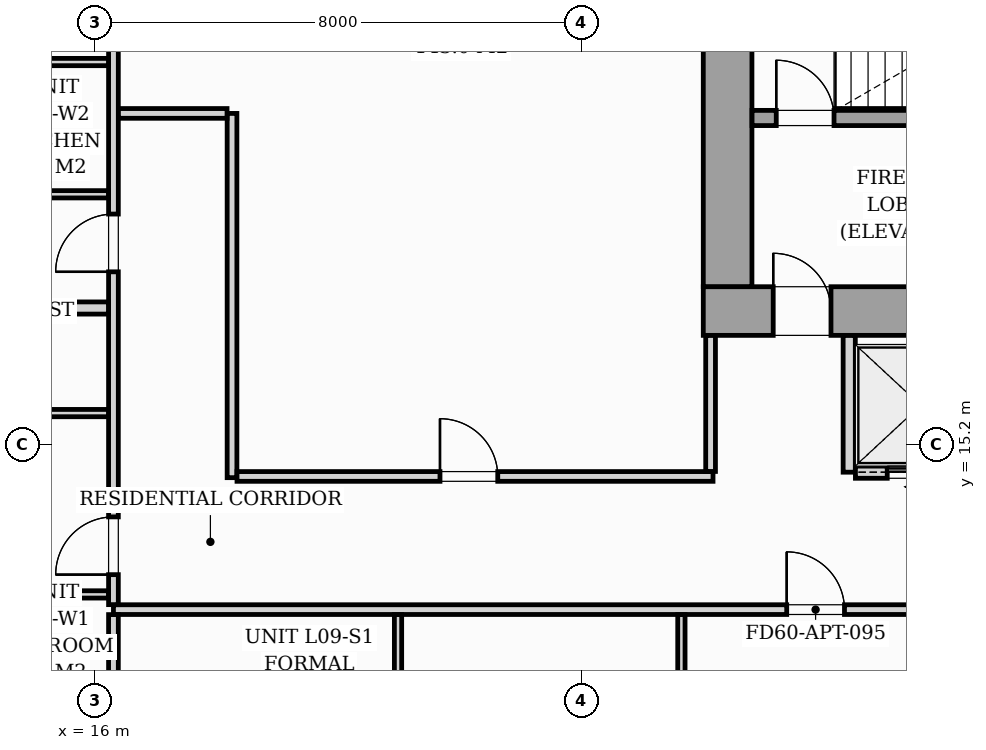
"""IFC4 building model, lengths in metres.
Left out: names, types, materials, properties, quantities, classifications, styles, units other than length and angle.
Written with IfcOpenShell. Run it as: python <this file> out.ifc"""

import sys

from ifc_helpers import new_model, si_unit, direction, frame, frame_2d, origin, origin_2d, place, context, subcontext, project, spatial, rectangle, i_section, extrude, source, transform, mapped, element, fill, save


model = new_model("IFC4")
c1 = context("Model", 3, precision=1e-05, world=origin(), true_north=direction((0.0, 1.0)))
c2 = subcontext(c1, "Body", "Model", "MODEL_VIEW")
j1 = project(units=[si_unit("LENGTHUNIT", "METRE"), si_unit("PLANEANGLEUNIT", "RADIAN")], contexts=[c1])
p1 = place(None, origin())
s1 = spatial("IfcSite", under=j1, at=p1, CompositionType="ELEMENT")
p2 = place(p1, origin())
s2 = spatial("IfcBuilding", under=s1, at=p2, CompositionType="ELEMENT")
p3 = place(p2, frame((0.0, 0.0, 35.8)))
s3 = spatial("IfcBuildingStorey", under=s2, at=p3, CompositionType="ELEMENT", Elevation=35.8)
m1 = source(origin(), c2, "Body", "SweptSolid", [
    extrude(i_section(OverallWidth=0.437, OverallDepth=0.514, WebThickness=0.061, FlangeThickness=0.097, FilletRadius=0.018, at=origin_2d()), origin(), (0.0, 0.0, 1.0), 3.196),
])
p4 = place(p3, frame((26.4, 17.4, 0.002), z_axis=(0.0, 0.0, 1.0), x_axis=(1.0, 0.0, 0.0)))
e1 = element("IfcColumn", 1, at=p4, inside=s3, PredefinedType="PILASTER", context=c2, shape_type="MappedRepresentation", body=[
    mapped(m1, transform((0.0, 0.0, 0.0), scale=1.0)),
])
p5 = place(p3, frame((26.0, 17.4, 0.0), z_axis=(0.0, 0.0, 1.0), x_axis=(1.0, 0.0, 0.0)))
e2 = element("IfcWall", 2, at=p5, inside=s3, PredefinedType="SHEAR", context=c2, shape_type="SweptSolid", body=[
    extrude(rectangle(XDim=20.0, YDim=0.8, at=frame_2d((10.0, 0.0))), origin(), (0.0, 0.0, 1.0), 3.2),
])
p6 = place(p5, frame((1.15, 0.0, 0.0)))
e3 = element("IfcOpeningElement", 3, at=p6, cuts=e2, PredefinedType="OPENING", context=c2, shape_type="SweptSolid", body=[
    extrude(rectangle(XDim=0.95, YDim=2.06, at=frame_2d((0.475, 1.03))), frame((0.0, 0.41, 0.0), z_axis=(0.0, -1.0, 0.0), x_axis=(1.0, 0.0, 0.0)), (0.0, 0.0, 1.0), 0.82),
])
p7 = place(p5, frame((9.58, 0.0, 0.0)))
e4 = element("IfcOpeningElement", 4, at=p7, cuts=e2, PredefinedType="OPENING", context=c2, shape_type="SweptSolid", body=[
    extrude(rectangle(XDim=0.85, YDim=2.0, at=frame_2d((0.425, 1.0))), frame((0.0, 0.41, 0.0), z_axis=(0.0, -1.0, 0.0), x_axis=(1.0, 0.0, 0.0)), (0.0, 0.0, 1.0), 0.82),
])
p8 = place(p5, frame((17.75, 0.0, 0.0)))
e5 = element("IfcOpeningElement", 5, at=p8, cuts=e2, PredefinedType="OPENING", context=c2, shape_type="SweptSolid", body=[
    extrude(rectangle(XDim=0.95, YDim=2.06, at=frame_2d((0.475, 1.03))), frame((0.0, 0.41, 0.0), z_axis=(0.0, -1.0, 0.0), x_axis=(1.0, 0.0, 0.0)), (0.0, 0.0, 1.0), 0.82),
])
p9 = place(p3, frame((26.4, 17.802, 0.0), z_axis=(0.0, 0.0, 1.0), x_axis=(0.0, 1.0, 0.0)))
e6 = element("IfcWall", 6, at=p9, inside=s3, PredefinedType="SHEAR", context=c2, shape_type="SweptSolid", body=[
    extrude(rectangle(XDim=5.796, YDim=0.8, at=frame_2d((2.898, 0.0))), origin(), (0.0, 0.0, 1.0), 3.2),
])
p10 = place(p3, frame((26.802, 20.575, 0.0), z_axis=(0.0, 0.0, 1.0), x_axis=(1.0, 0.0, 0.0)))
e7 = element("IfcWall", 7, at=p10, inside=s3, PredefinedType="SOLIDWALL", context=c2, shape_type="SweptSolid", body=[
    extrude(rectangle(XDim=8.148, YDim=0.25, at=frame_2d((4.074, 0.0))), origin(), (0.0, 0.0, 1.0), 3.2),
])
p11 = place(p10, frame((0.398, 0.0, 0.0)))
e8 = element("IfcOpeningElement", 8, at=p11, cuts=e7, PredefinedType="OPENING", context=c2, shape_type="SweptSolid", body=[
    extrude(rectangle(XDim=0.95, YDim=2.06, at=frame_2d((0.475, 1.03))), frame((0.0, 0.135, 0.0), z_axis=(0.0, -1.0, 0.0), x_axis=(1.0, 0.0, 0.0)), (0.0, 0.0, 1.0), 0.27),
])
p12 = place(p3, frame((28.4, 14.75, 0.0), z_axis=(0.0, 0.0, 1.0), x_axis=(0.0, 1.0, 0.0)))
e9 = element("IfcWall", 9, at=p12, inside=s3, PredefinedType="PARTITIONING", context=c2, shape_type="SweptSolid", body=[
    extrude(rectangle(XDim=2.248, YDim=0.2, at=frame_2d((1.124, 0.0))), origin(), (0.0, 0.0, 1.0), 2.94),
])
p13 = place(p3, frame((28.502, 14.75, 0.0), z_axis=(0.0, 0.0, 1.0), x_axis=(1.0, 0.0, 0.0)))
e10 = element("IfcWall", 10, at=p13, inside=s3, PredefinedType="PARTITIONING", context=c2, shape_type="SweptSolid", body=[
    extrude(rectangle(XDim=2.146, YDim=0.2, at=frame_2d((1.073, 0.0))), origin(), (0.0, 0.0, 1.0), 2.94),
])
p14 = place(p13, frame((0.523, 0.0, 0.0)))
e11 = element("IfcOpeningElement", 11, at=p14, cuts=e10, PredefinedType="OPENING", context=c2, shape_type="SweptSolid", body=[
    extrude(rectangle(XDim=1.05, YDim=2.08, at=frame_2d((0.525, 1.04))), frame((0.0, 0.11, 0.0), z_axis=(0.0, -1.0, 0.0), x_axis=(1.0, 0.0, 0.0)), (0.0, 0.0, 1.0), 0.22),
])
p15 = place(p3, frame((16.3, 12.49, 0.0), z_axis=(0.0, 0.0, 1.0), x_axis=(1.0, 0.0, 0.0)))
e12 = element("IfcWall", 12, at=p15, inside=s3, PredefinedType="PARTITIONING", context=c2, shape_type="SweptSolid", body=[
    extrude(rectangle(XDim=35.2, YDim=0.16, at=frame_2d((17.6, 0.0))), origin(), (0.0, 0.0, 1.0), 2.94),
])
p16 = place(p15, frame((11.072, 0.0, 0.0)))
e13 = element("IfcOpeningElement", 13, at=p16, cuts=e12, PredefinedType="OPENING", context=c2, shape_type="SweptSolid", body=[
    extrude(rectangle(XDim=0.95, YDim=2.06, at=frame_2d((0.475, 1.03))), frame((0.0, 0.09, 0.0), z_axis=(0.0, -1.0, 0.0), x_axis=(1.0, 0.0, 0.0)), (0.0, 0.0, 1.0), 0.18),
])
p17 = place(p15, frame((24.032, 0.0, 0.0)))
e14 = element("IfcOpeningElement", 14, at=p17, cuts=e12, PredefinedType="OPENING", context=c2, shape_type="SweptSolid", body=[
    extrude(rectangle(XDim=0.95, YDim=2.06, at=frame_2d((0.475, 1.03))), frame((0.0, 0.09, 0.0), z_axis=(0.0, -1.0, 0.0), x_axis=(1.0, 0.0, 0.0)), (0.0, 0.0, 1.0), 0.18),
])
p18 = place(p3, frame((16.3, 2.962, 0.0), z_axis=(0.0, 0.0, 1.0), x_axis=(0.0, 1.0, 0.0)))
e15 = element("IfcWall", 15, at=p18, inside=s3, PredefinedType="PARTITIONING", context=c2, shape_type="SweptSolid", body=[
    extrude(rectangle(XDim=9.446, YDim=0.16, at=frame_2d((4.723, 0.0))), origin(), (0.0, 0.0, 1.0), 2.94),
])
p19 = place(p3, frame((16.3, 12.572, 0.0), z_axis=(0.0, 0.0, 1.0), x_axis=(0.0, 1.0, 0.0)))
e16 = element("IfcWall", 16, at=p19, inside=s3, PredefinedType="PARTITIONING", context=c2, shape_type="SweptSolid", body=[
    extrude(rectangle(XDim=14.866, YDim=0.16, at=frame_2d((7.433, 0.0))), origin(), (0.0, 0.0, 1.0), 2.94),
])
p20 = place(p19, frame((0.493, 0.0, 0.0)))
e17 = element("IfcOpeningElement", 17, at=p20, cuts=e16, PredefinedType="OPENING", context=c2, shape_type="SweptSolid", body=[
    extrude(rectangle(XDim=0.95, YDim=2.06, at=frame_2d((0.475, 1.03))), frame((0.0, 0.09, 0.0), z_axis=(0.0, -1.0, 0.0), x_axis=(1.0, 0.0, 0.0)), (0.0, 0.0, 1.0), 0.18),
])
p21 = place(p19, frame((5.473, 0.0, 0.0)))
e18 = element("IfcOpeningElement", 18, at=p21, cuts=e16, PredefinedType="OPENING", context=c2, shape_type="SweptSolid", body=[
    extrude(rectangle(XDim=0.95, YDim=2.06, at=frame_2d((0.475, 1.03))), frame((0.0, 0.09, 0.0), z_axis=(0.0, -1.0, 0.0), x_axis=(1.0, 0.0, 0.0)), (0.0, 0.0, 1.0), 0.18),
])
p22 = place(p3, frame((20.98, 2.962, 0.0), z_axis=(0.0, 0.0, 1.0), x_axis=(0.0, 1.0, 0.0)))
e19 = element("IfcWall", 19, at=p22, inside=s3, PredefinedType="PARTITIONING", context=c2, shape_type="SweptSolid", body=[
    extrude(rectangle(XDim=9.446, YDim=0.12, at=frame_2d((4.723, 0.0))), origin(), (0.0, 0.0, 1.0), 2.94),
])
p23 = place(p22, frame((4.288, 0.0, 0.0)))
e20 = element("IfcOpeningElement", 20, at=p23, cuts=e19, PredefinedType="OPENING", context=c2, shape_type="SweptSolid", body=[
    extrude(rectangle(XDim=0.85, YDim=2.05, at=frame_2d((0.425, 1.025))), frame((0.0, 0.07, 0.0), z_axis=(0.0, -1.0, 0.0), x_axis=(1.0, 0.0, 0.0)), (0.0, 0.0, 1.0), 0.14),
])
p24 = place(p3, frame((25.64, 2.78, 0.0), z_axis=(0.0, 0.0, 1.0), x_axis=(0.0, 1.0, 0.0)))
e21 = element("IfcWall", 21, at=p24, inside=s3, PredefinedType="PARTITIONING", context=c2, shape_type="SweptSolid", body=[
    extrude(rectangle(XDim=9.628, YDim=0.12, at=frame_2d((4.814, 0.0))), origin(), (0.0, 0.0, 1.0), 2.94),
])
p25 = place(p24, frame((4.47, 0.0, 0.0)))
e22 = element("IfcOpeningElement", 22, at=p25, cuts=e21, PredefinedType="OPENING", context=c2, shape_type="SweptSolid", body=[
    extrude(rectangle(XDim=0.85, YDim=2.05, at=frame_2d((0.425, 1.025))), frame((0.0, 0.07, 0.0), z_axis=(0.0, -1.0, 0.0), x_axis=(1.0, 0.0, 0.0)), (0.0, 0.0, 1.0), 0.14),
])
p26 = place(p3, frame((5.88, 17.45, 0.0), z_axis=(0.0, 0.0, 1.0), x_axis=(1.0, 0.0, 0.0)))
e23 = element("IfcWall", 23, at=p26, inside=s3, PredefinedType="PARTITIONING", context=c2, shape_type="SweptSolid", body=[
    extrude(rectangle(XDim=10.338, YDim=0.2, at=frame_2d((5.169, 0.0))), origin(), (0.0, 0.0, 1.0), 2.94),
])
p27 = place(p3, frame((13.962, 12.74, 0.0), z_axis=(0.0, 0.0, 1.0), x_axis=(1.0, 0.0, 0.0)))
e24 = element("IfcWall", 24, at=p27, inside=s3, PredefinedType="PARTITIONING", context=c2, shape_type="SweptSolid", body=[
    extrude(rectangle(XDim=2.256, YDim=0.12, at=frame_2d((1.128, 0.0))), origin(), (0.0, 0.0, 1.0), 2.94),
])
p28 = place(p3, frame((5.88, 15.722, 0.0), z_axis=(0.0, 0.0, 1.0), x_axis=(1.0, 0.0, 0.0)))
e25 = element("IfcWall", 25, at=p28, inside=s3, PredefinedType="PARTITIONING", context=c2, shape_type="SweptSolid", body=[
    extrude(rectangle(XDim=10.338, YDim=0.12, at=frame_2d((5.169, 0.0))), origin(), (0.0, 0.0, 1.0), 2.045),
])
p29 = place(p28, frame((4.735, 0.0, 0.0)))
e26 = element("IfcOpeningElement", 26, at=p29, cuts=e25, PredefinedType="OPENING", context=c2, shape_type="SweptSolid", body=[
    extrude(rectangle(XDim=0.85, YDim=2.01, at=frame_2d((0.425, 1.005))), frame((0.0, 0.07, 0.0), z_axis=(0.0, -1.0, 0.0), x_axis=(1.0, 0.0, 0.0)), (0.0, 0.0, 1.0), 0.14),
])
for number, where, z_axis, x_axis in (
    (27, (13.962, 21.495, 0.0), (0.0, 0.0, 1.0), (1.0, 0.0, 0.0)),
    (28, (13.962, 19.32, 0.0), (0.0, 0.0, 1.0), (1.0, 0.0, 0.0)),
):
    element("IfcWall", number, at=place(p3, frame(where, z_axis=z_axis, x_axis=x_axis)), inside=s3, PredefinedType="PARTITIONING", context=c2, shape_type="SweptSolid", body=[
        extrude(rectangle(XDim=2.256, YDim=0.12, at=frame_2d((1.128, 0.0))), origin(), (0.0, 0.0, 1.0), 2.94),
    ])
p30 = place(p3, frame((18.25, 14.66, 0.0), z_axis=(0.0, 0.0, 1.0), x_axis=(0.0, 1.0, 0.0)))
e29 = element("IfcWall", 29, at=p30, inside=s3, PredefinedType="PARTITIONING", context=c2, shape_type="SweptSolid", body=[
    extrude(rectangle(XDim=5.99, YDim=0.16, at=frame_2d((2.995, 0.0))), origin(), (0.0, 0.0, 1.0), 2.94),
])
p31 = place(p3, frame((16.382, 20.65, 0.0), z_axis=(0.0, 0.0, 1.0), x_axis=(1.0, 0.0, 0.0)))
e30 = element("IfcWall", 30, at=p31, inside=s3, PredefinedType="PARTITIONING", context=c2, shape_type="SweptSolid", body=[
    extrude(rectangle(XDim=1.786, YDim=0.16, at=frame_2d((0.893, 0.0))), origin(), (0.0, 0.0, 1.0), 2.94),
])
p32 = place(p3, frame((18.332, 14.68, 0.0), z_axis=(0.0, 0.0, 1.0), x_axis=(1.0, 0.0, 0.0)))
e31 = element("IfcWall", 31, at=p32, inside=s3, PredefinedType="PARTITIONING", context=c2, shape_type="SweptSolid", body=[
    extrude(rectangle(XDim=7.828, YDim=0.16, at=frame_2d((3.914, 0.0))), origin(), (0.0, 0.0, 1.0), 2.94),
])
p33 = place(p32, frame((3.338, 0.0, 0.0)))
e32 = element("IfcOpeningElement", 32, at=p33, cuts=e31, PredefinedType="OPENING", context=c2, shape_type="SweptSolid", body=[
    extrude(rectangle(XDim=0.95, YDim=2.06, at=frame_2d((0.475, 1.03))), frame((0.0, 0.09, 0.0), z_axis=(0.0, -1.0, 0.0), x_axis=(1.0, 0.0, 0.0)), (0.0, 0.0, 1.0), 0.18),
])
p34 = place(p3, frame((26.12, 14.762, 0.0), z_axis=(0.0, 0.0, 1.0), x_axis=(0.0, 1.0, 0.0)))
e33 = element("IfcWall", 33, at=p34, inside=s3, PredefinedType="PARTITIONING", context=c2, shape_type="SweptSolid", body=[
    extrude(rectangle(XDim=2.236, YDim=0.16, at=frame_2d((1.118, 0.0))), origin(), (0.0, 0.0, 1.0), 2.94),
])
m2 = source(origin(), c2, "Body", "SweptSolid", [
    extrude(rectangle(XDim=0.95, YDim=2.06, at=frame_2d((0.475, 1.03))), frame((0.0, 0.025, 0.0), z_axis=(0.0, -1.0, 0.0), x_axis=(1.0, 0.0, 0.0)), (0.0, 0.0, 1.0), 0.05),
])
p35 = place(p6, origin())
e34 = element("IfcDoor", 34, at=p35, inside=s3, OperationType="SINGLE_SWING_LEFT", PredefinedType="DOOR", context=c2, shape_type="MappedRepresentation", body=[
    mapped(m2, transform((0.0, 0.0, 0.0), scale=1.0)),
])
fill(e3, e34)
p36 = place(p11, origin())
e35 = element("IfcDoor", 35, at=p36, inside=s3, OperationType="SINGLE_SWING_LEFT", PredefinedType="DOOR", context=c2, shape_type="MappedRepresentation", body=[
    mapped(m2, transform((0.0, 0.0, 0.0), scale=1.0)),
])
fill(e8, e35)
m3 = source(origin(), c2, "Body", "SweptSolid", [
    extrude(rectangle(XDim=1.05, YDim=2.08, at=frame_2d((0.525, 1.04))), frame((0.0, 0.025, 0.0), z_axis=(0.0, -1.0, 0.0), x_axis=(1.0, 0.0, 0.0)), (0.0, 0.0, 1.0), 0.05),
])
p37 = place(p14, origin())
e36 = element("IfcDoor", 36, at=p37, inside=s3, OperationType="SLIDING_TO_LEFT", PredefinedType="DOOR", context=c2, shape_type="MappedRepresentation", body=[
    mapped(m3, transform((0.0, 0.0, 0.0), scale=1.0)),
])
fill(e11, e36)
m4 = source(origin(), c2, "Body", "SweptSolid", [
    extrude(rectangle(XDim=0.95, YDim=2.06, at=frame_2d((0.475, 1.03))), frame((0.0, 0.025, 0.0), z_axis=(0.0, -1.0, 0.0), x_axis=(1.0, 0.0, 0.0)), (0.0, 0.0, 1.0), 0.05),
])
p38 = place(p16, origin())
e37 = element("IfcDoor", 37, at=p38, inside=s3, OperationType="SINGLE_SWING_LEFT", PredefinedType="DOOR", context=c2, shape_type="MappedRepresentation", body=[
    mapped(m4, transform((0.0, 0.0, 0.0), scale=1.0)),
])
fill(e13, e37)
p39 = place(p20, origin())
e38 = element("IfcDoor", 38, at=p39, inside=s3, OperationType="SINGLE_SWING_LEFT", PredefinedType="DOOR", context=c2, shape_type="MappedRepresentation", body=[
    mapped(m4, transform((0.0, 0.0, 0.0), scale=1.0)),
])
fill(e17, e38)
p40 = place(p21, origin())
e39 = element("IfcDoor", 39, at=p40, inside=s3, OperationType="SINGLE_SWING_LEFT", PredefinedType="DOOR", context=c2, shape_type="MappedRepresentation", body=[
    mapped(m4, transform((0.0, 0.0, 0.0), scale=1.0)),
])
fill(e18, e39)
p41 = place(p33, origin())
e40 = element("IfcDoor", 40, at=p41, inside=s3, OperationType="SINGLE_SWING_LEFT", PredefinedType="DOOR", context=c2, shape_type="MappedRepresentation", body=[
    mapped(m4, transform((0.0, 0.0, 0.0), scale=1.0)),
])
fill(e32, e40)
save(model, sys.argv[1])
